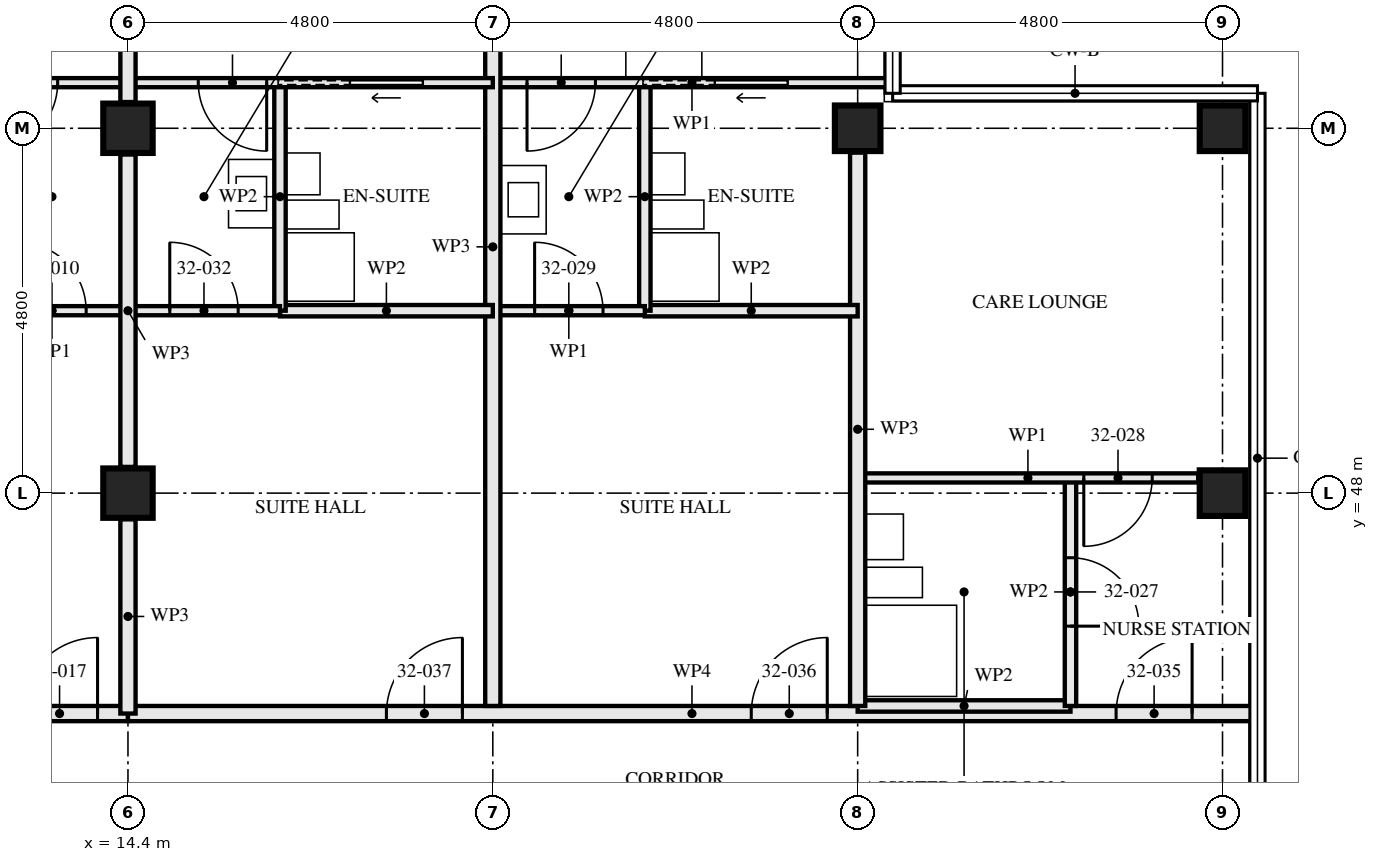
"""IFC4 building model, lengths in metres.
Left out: names, types, materials, properties, quantities, classifications, styles, units other than length and angle.
Written with IfcOpenShell. Run it as: python <this file> out.ifc"""

import sys

from ifc_helpers import new_model, si_unit, direction, frame, frame_2d, origin, origin_2d, place, context, subcontext, project, spatial, rectangle, hollow_rectangle, extrude, element, fill, save


model = new_model("IFC4")
c1 = context("Model", 3, precision=1e-05, world=origin(), true_north=direction((0.0, 1.0)))
c2 = subcontext(c1, "Body", "Model", "MODEL_VIEW")
j1 = project(units=[si_unit("LENGTHUNIT", "METRE"), si_unit("PLANEANGLEUNIT", "RADIAN")], contexts=[c1])
p1 = place(None, origin())
s1 = spatial("IfcSite", under=j1, at=p1, CompositionType="ELEMENT")
p2 = place(p1, origin())
s2 = spatial("IfcBuilding", under=s1, at=p2, CompositionType="ELEMENT")
p3 = place(p2, frame((0.0, 0.0, 119.0)))
s3 = spatial("IfcBuildingStorey", under=s2, at=p3, CompositionType="ELEMENT", Elevation=119.0)
for number, where, z_axis, x_axis in (
    (1, (14.4, 48.0, 0.0), (0.0, 0.0, 1.0), (1.0, 0.0, 0.0)),
    (2, (14.4, 52.8, 0.0), (0.0, 0.0, 1.0), (1.0, 0.0, 0.0)),
):
    element("IfcColumn", number, at=place(p3, frame(where, z_axis=z_axis, x_axis=x_axis)), inside=s3, PredefinedType="COLUMN", context=c2, shape_type="SweptSolid", body=[
        extrude(hollow_rectangle(XDim=0.65, YDim=0.65, WallThickness=0.05, at=origin_2d()), origin(), (0.0, 0.0, 1.0), 3.5),
    ])
for number, where, z_axis, x_axis in (
    (3, (24.0, 52.8, 0.0), (0.0, 0.0, 1.0), (0.0, 1.0, 0.0)),
    (4, (28.8, 48.0, 0.0), (0.0, 0.0, 1.0), (1.0, 0.0, 0.0)),
    (5, (28.8, 52.8, 0.0), (0.0, 0.0, 1.0), (0.0, 1.0, 0.0)),
):
    element("IfcColumn", number, at=place(p3, frame(where, z_axis=z_axis, x_axis=x_axis)), inside=s3, PredefinedType="COLUMN", context=c2, shape_type="SweptSolid", body=[
        extrude(hollow_rectangle(XDim=0.6, YDim=0.6, WallThickness=0.08, at=origin_2d()), origin(), (0.0, 0.0, 1.0), 3.5),
    ])
p4 = place(p3, frame((14.4, 50.4, 0.0), z_axis=(0.0, 0.0, 1.0), x_axis=(-1.0, 0.0, 0.0)))
e6 = element("IfcWall", 6, at=p4, inside=s3, PredefinedType="PARTITIONING", context=c2, shape_type="SweptSolid", body=[
    extrude(rectangle(XDim=2.0, YDim=0.12, at=frame_2d((1.0, 0.0))), origin(), (0.0, 0.0, 1.0), 3.33),
])
p5 = place(p4, frame((0.55, 0.0, 0.0)))
e7 = element("IfcOpeningElement", 7, at=p5, cuts=e6, PredefinedType="OPENING", context=c2, shape_type="SweptSolid", body=[
    extrude(rectangle(XDim=0.9, YDim=2.1, at=frame_2d((0.45, 1.05))), frame((0.0, 0.071, 0.0), z_axis=(0.0, -1.0, 0.0), x_axis=(1.0, 0.0, 0.0)), (0.0, 0.0, 1.0), 0.141),
])
p6 = place(p3, frame((14.4, 53.4, 0.0), z_axis=(0.0, 0.0, 1.0), x_axis=(-1.0, 0.0, 0.0)))
e8 = element("IfcWall", 8, at=p6, inside=s3, PredefinedType="PARTITIONING", context=c2, shape_type="SweptSolid", body=[
    extrude(rectangle(XDim=4.8, YDim=0.12, at=frame_2d((2.4, 0.0))), origin(), (0.0, 0.0, 1.0), 3.33),
])
p7 = place(p6, frame((0.925, 0.0, 0.0)))
e9 = element("IfcOpeningElement", 9, at=p7, cuts=e8, PredefinedType="OPENING", context=c2, shape_type="SweptSolid", body=[
    extrude(rectangle(XDim=0.9, YDim=2.1, at=frame_2d((0.45, 1.05))), frame((0.0, 0.071, 0.0), z_axis=(0.0, -1.0, 0.0), x_axis=(1.0, 0.0, 0.0)), (0.0, 0.0, 1.0), 0.141),
])
p8 = place(p6, frame((2.925, 0.0, 0.0)))
e10 = element("IfcOpeningElement", 10, at=p8, cuts=e8, PredefinedType="OPENING", context=c2, shape_type="SweptSolid", body=[
    extrude(rectangle(XDim=0.95, YDim=2.1, at=frame_2d((0.475, 1.05))), frame((0.0, 0.071, 0.0), z_axis=(0.0, -1.0, 0.0), x_axis=(1.0, 0.0, 0.0)), (0.0, 0.0, 1.0), 0.141),
])
p9 = place(p3, frame((14.4, 45.1, 0.0), z_axis=(0.0, 0.0, 1.0), x_axis=(-1.0, 0.0, 0.0)))
e11 = element("IfcWall", 11, at=p9, inside=s3, PredefinedType="PARTITIONING", context=c2, shape_type="SweptSolid", body=[
    extrude(rectangle(XDim=9.6, YDim=0.2, at=frame_2d((4.8, 0.0))), origin(), (0.0, 0.0, 1.0), 3.33),
])
p10 = place(p9, frame((0.4, 0.0, 0.0)))
e12 = element("IfcOpeningElement", 12, at=p10, cuts=e11, PredefinedType="OPENING", context=c2, shape_type="SweptSolid", body=[
    extrude(rectangle(XDim=1.0, YDim=2.1, at=frame_2d((0.5, 1.05))), frame((0.0, 0.111, 0.0), z_axis=(0.0, -1.0, 0.0), x_axis=(1.0, 0.0, 0.0)), (0.0, 0.0, 1.0), 0.221),
])
p11 = place(p9, frame((5.2, 0.0, 0.0)))
e13 = element("IfcOpeningElement", 13, at=p11, cuts=e11, PredefinedType="OPENING", context=c2, shape_type="SweptSolid", body=[
    extrude(rectangle(XDim=1.0, YDim=2.1, at=frame_2d((0.5, 1.05))), frame((0.0, 0.111, 0.0), z_axis=(0.0, -1.0, 0.0), x_axis=(1.0, 0.0, 0.0)), (0.0, 0.0, 1.0), 0.221),
])
p12 = place(p3, frame((26.8, 48.2, 0.0), z_axis=(0.0, 0.0, 1.0), x_axis=(0.0, -1.0, 0.0)))
e14 = element("IfcWall", 14, at=p12, inside=s3, PredefinedType="PARTITIONING", context=c2, shape_type="SweptSolid", body=[
    extrude(rectangle(XDim=3.0, YDim=0.15, at=frame_2d((1.5, 0.0))), origin(), (0.0, 0.0, 1.0), 2.55),
])
p13 = place(p12, frame((1.05, 0.0, 0.0)))
e15 = element("IfcOpeningElement", 15, at=p13, cuts=e14, PredefinedType="OPENING", context=c2, shape_type="SweptSolid", body=[
    extrude(rectangle(XDim=0.9, YDim=2.1, at=frame_2d((0.45, 1.05))), frame((0.0, 0.085, 0.0), z_axis=(0.0, -1.0, 0.0), x_axis=(1.0, 0.0, 0.0)), (0.0, 0.0, 1.0), 0.171),
])
p14 = place(p3, frame((26.8, 45.2, 0.0), z_axis=(0.0, 0.0, 1.0), x_axis=(-1.0, 0.0, 0.0)))
e16 = element("IfcWall", 16, at=p14, inside=s3, PredefinedType="PARTITIONING", context=c2, shape_type="SweptSolid", body=[
    extrude(rectangle(XDim=2.8, YDim=0.15, at=frame_2d((1.4, 0.0))), origin(), (0.0, 0.0, 1.0), 3.33),
])
p15 = place(p3, frame((28.48, 48.2, 0.0), z_axis=(0.0, 0.0, 1.0), x_axis=(-1.0, 0.0, 0.0)))
e17 = element("IfcWall", 17, at=p15, inside=s3, PredefinedType="PARTITIONING", context=c2, shape_type="SweptSolid", body=[
    extrude(rectangle(XDim=4.48, YDim=0.12, at=frame_2d((2.24, 0.0))), origin(), (0.0, 0.0, 1.0), 3.33),
])
p16 = place(p15, frame((0.605, 0.0, 0.0)))
e18 = element("IfcOpeningElement", 18, at=p16, cuts=e17, PredefinedType="OPENING", context=c2, shape_type="SweptSolid", body=[
    extrude(rectangle(XDim=0.9, YDim=2.1, at=frame_2d((0.45, 1.05))), frame((0.0, 0.071, 0.0), z_axis=(0.0, -1.0, 0.0), x_axis=(1.0, 0.0, 0.0)), (0.0, 0.0, 1.0), 0.141),
])
p17 = place(p3, frame((24.0, 52.48, 0.0), z_axis=(0.0, 0.0, 1.0), x_axis=(0.0, -1.0, 0.0)))
e19 = element("IfcWall", 19, at=p17, inside=s3, PredefinedType="PARTITIONING", context=c2, shape_type="SweptSolid", body=[
    extrude(rectangle(XDim=7.28, YDim=0.2, at=frame_2d((3.64, 0.0))), origin(), (0.0, 0.0, 1.0), 2.55),
])
p18 = place(p3, frame((21.2, 53.4, 0.0), z_axis=(0.0, 0.0, 1.0), x_axis=(0.0, -1.0, 0.0)))
e20 = element("IfcWall", 20, at=p18, inside=s3, PredefinedType="PARTITIONING", context=c2, shape_type="SweptSolid", body=[
    extrude(rectangle(XDim=3.0, YDim=0.15, at=frame_2d((1.5, 0.0))), origin(), (0.0, 0.0, 1.0), 2.55),
])
p19 = place(p3, frame((24.0, 50.4, 0.0), z_axis=(0.0, 0.0, 1.0), x_axis=(-1.0, 0.0, 0.0)))
e21 = element("IfcWall", 21, at=p19, inside=s3, PredefinedType="PARTITIONING", context=c2, shape_type="SweptSolid", body=[
    extrude(rectangle(XDim=2.8, YDim=0.15, at=frame_2d((1.4, 0.0))), origin(), (0.0, 0.0, 1.0), 3.33),
])
p20 = place(p3, frame((21.2, 50.4, 0.0), z_axis=(0.0, 0.0, 1.0), x_axis=(-1.0, 0.0, 0.0)))
e22 = element("IfcWall", 22, at=p20, inside=s3, PredefinedType="PARTITIONING", context=c2, shape_type="SweptSolid", body=[
    extrude(rectangle(XDim=2.0, YDim=0.12, at=frame_2d((1.0, 0.0))), origin(), (0.0, 0.0, 1.0), 3.33),
])
p21 = place(p20, frame((0.55, 0.0, 0.0)))
e23 = element("IfcOpeningElement", 23, at=p21, cuts=e22, PredefinedType="OPENING", context=c2, shape_type="SweptSolid", body=[
    extrude(rectangle(XDim=0.9, YDim=2.1, at=frame_2d((0.45, 1.05))), frame((0.0, 0.071, 0.0), z_axis=(0.0, -1.0, 0.0), x_axis=(1.0, 0.0, 0.0)), (0.0, 0.0, 1.0), 0.141),
])
p22 = place(p3, frame((24.44, 53.4, 0.0), z_axis=(0.0, 0.0, 1.0), x_axis=(-1.0, 0.0, 0.0)))
e24 = element("IfcWall", 24, at=p22, inside=s3, PredefinedType="PARTITIONING", context=c2, shape_type="SweptSolid", body=[
    extrude(rectangle(XDim=5.24, YDim=0.12, at=frame_2d((2.62, 0.0))), origin(), (0.0, 0.0, 1.0), 2.32),
])
p23 = place(p22, frame((3.89, 0.0, 0.0)))
e25 = element("IfcOpeningElement", 25, at=p23, cuts=e24, PredefinedType="OPENING", context=c2, shape_type="SweptSolid", body=[
    extrude(rectangle(XDim=0.9, YDim=2.1, at=frame_2d((0.45, 1.05))), frame((0.0, 0.071, 0.0), z_axis=(0.0, -1.0, 0.0), x_axis=(1.0, 0.0, 0.0)), (0.0, 0.0, 1.0), 0.141),
])
p24 = place(p22, frame((1.365, 0.0, 0.0)))
e26 = element("IfcOpeningElement", 26, at=p24, cuts=e24, PredefinedType="OPENING", context=c2, shape_type="SweptSolid", body=[
    extrude(rectangle(XDim=0.95, YDim=2.1, at=frame_2d((0.475, 1.05))), frame((0.0, 0.071, 0.0), z_axis=(0.0, -1.0, 0.0), x_axis=(1.0, 0.0, 0.0)), (0.0, 0.0, 1.0), 0.141),
])
p25 = place(p3, frame((19.2, 57.28, 0.0), z_axis=(0.0, 0.0, 1.0), x_axis=(0.0, -1.0, 0.0)))
e27 = element("IfcWall", 27, at=p25, inside=s3, PredefinedType="PARTITIONING", context=c2, shape_type="SweptSolid", body=[
    extrude(rectangle(XDim=12.08, YDim=0.2, at=frame_2d((6.04, 0.0))), origin(), (0.0, 0.0, 1.0), 2.55),
])
p26 = place(p3, frame((16.4, 53.4, 0.0), z_axis=(0.0, 0.0, 1.0), x_axis=(0.0, -1.0, 0.0)))
e28 = element("IfcWall", 28, at=p26, inside=s3, PredefinedType="PARTITIONING", context=c2, shape_type="SweptSolid", body=[
    extrude(rectangle(XDim=3.0, YDim=0.15, at=frame_2d((1.5, 0.0))), origin(), (0.0, 0.0, 1.0), 2.55),
])
p27 = place(p3, frame((19.2, 50.4, 0.0), z_axis=(0.0, 0.0, 1.0), x_axis=(-1.0, 0.0, 0.0)))
e29 = element("IfcWall", 29, at=p27, inside=s3, PredefinedType="PARTITIONING", context=c2, shape_type="SweptSolid", body=[
    extrude(rectangle(XDim=2.8, YDim=0.15, at=frame_2d((1.4, 0.0))), origin(), (0.0, 0.0, 1.0), 3.33),
])
p28 = place(p3, frame((16.4, 50.4, 0.0), z_axis=(0.0, 0.0, 1.0), x_axis=(-1.0, 0.0, 0.0)))
e30 = element("IfcWall", 30, at=p28, inside=s3, PredefinedType="PARTITIONING", context=c2, shape_type="SweptSolid", body=[
    extrude(rectangle(XDim=2.0, YDim=0.12, at=frame_2d((1.0, 0.0))), origin(), (0.0, 0.0, 1.0), 3.33),
])
p29 = place(p28, frame((0.55, 0.0, 0.0)))
e31 = element("IfcOpeningElement", 31, at=p29, cuts=e30, PredefinedType="OPENING", context=c2, shape_type="SweptSolid", body=[
    extrude(rectangle(XDim=0.9, YDim=2.1, at=frame_2d((0.45, 1.05))), frame((0.0, 0.071, 0.0), z_axis=(0.0, -1.0, 0.0), x_axis=(1.0, 0.0, 0.0)), (0.0, 0.0, 1.0), 0.141),
])
p30 = place(p3, frame((19.2, 53.4, 0.0), z_axis=(0.0, 0.0, 1.0), x_axis=(-1.0, 0.0, 0.0)))
e32 = element("IfcWall", 32, at=p30, inside=s3, PredefinedType="PARTITIONING", context=c2, shape_type="SweptSolid", body=[
    extrude(rectangle(XDim=4.8, YDim=0.12, at=frame_2d((2.4, 0.0))), origin(), (0.0, 0.0, 1.0), 3.33),
])
p31 = place(p30, frame((2.975, 0.0, 0.0)))
e33 = element("IfcOpeningElement", 33, at=p31, cuts=e32, PredefinedType="OPENING", context=c2, shape_type="SweptSolid", body=[
    extrude(rectangle(XDim=0.9, YDim=2.1, at=frame_2d((0.45, 1.05))), frame((0.0, 0.071, 0.0), z_axis=(0.0, -1.0, 0.0), x_axis=(1.0, 0.0, 0.0)), (0.0, 0.0, 1.0), 0.141),
])
p32 = place(p30, frame((0.925, 0.0, 0.0)))
e34 = element("IfcOpeningElement", 34, at=p32, cuts=e32, PredefinedType="OPENING", context=c2, shape_type="SweptSolid", body=[
    extrude(rectangle(XDim=0.95, YDim=2.1, at=frame_2d((0.475, 1.05))), frame((0.0, 0.071, 0.0), z_axis=(0.0, -1.0, 0.0), x_axis=(1.0, 0.0, 0.0)), (0.0, 0.0, 1.0), 0.141),
])
p33 = place(p3, frame((29.24, 45.1, 0.0), z_axis=(0.0, 0.0, 1.0), x_axis=(-1.0, 0.0, 0.0)))
e35 = element("IfcWall", 35, at=p33, inside=s3, PredefinedType="PARTITIONING", context=c2, shape_type="SweptSolid", body=[
    extrude(rectangle(XDim=14.84, YDim=0.2, at=frame_2d((7.42, 0.0))), origin(), (0.0, 0.0, 1.0), 2.32),
])
p34 = place(p33, frame((0.84, 0.0, 0.0)))
e36 = element("IfcOpeningElement", 36, at=p34, cuts=e35, PredefinedType="OPENING", context=c2, shape_type="SweptSolid", body=[
    extrude(rectangle(XDim=1.0, YDim=2.1, at=frame_2d((0.5, 1.05))), frame((0.0, 0.111, 0.0), z_axis=(0.0, -1.0, 0.0), x_axis=(1.0, 0.0, 0.0)), (0.0, 0.0, 1.0), 0.221),
])
p35 = place(p33, frame((5.64, 0.0, 0.0)))
e37 = element("IfcOpeningElement", 37, at=p35, cuts=e35, PredefinedType="OPENING", context=c2, shape_type="SweptSolid", body=[
    extrude(rectangle(XDim=1.0, YDim=2.1, at=frame_2d((0.5, 1.05))), frame((0.0, 0.111, 0.0), z_axis=(0.0, -1.0, 0.0), x_axis=(1.0, 0.0, 0.0)), (0.0, 0.0, 1.0), 0.221),
])
p36 = place(p33, frame((10.44, 0.0, 0.0)))
e38 = element("IfcOpeningElement", 38, at=p36, cuts=e35, PredefinedType="OPENING", context=c2, shape_type="SweptSolid", body=[
    extrude(rectangle(XDim=1.0, YDim=2.1, at=frame_2d((0.5, 1.05))), frame((0.0, 0.111, 0.0), z_axis=(0.0, -1.0, 0.0), x_axis=(1.0, 0.0, 0.0)), (0.0, 0.0, 1.0), 0.221),
])
p37 = place(p3, frame((14.4, 45.1, 0.0), z_axis=(0.0, 0.0, 1.0), x_axis=(0.0, 1.0, 0.0)))
e39 = element("IfcWall", 39, at=p37, inside=s3, PredefinedType="PARTITIONING", context=c2, shape_type="SweptSolid", body=[
    extrude(rectangle(XDim=2.555, YDim=0.2, at=frame_2d((1.277, 0.0))), origin(), (0.0, 0.0, 1.0), 2.32),
])
p38 = place(p3, frame((14.4, 48.345, 0.0), z_axis=(0.0, 0.0, 1.0), x_axis=(0.0, 1.0, 0.0)))
e40 = element("IfcWall", 40, at=p38, inside=s3, PredefinedType="PARTITIONING", context=c2, shape_type="SweptSolid", body=[
    extrude(rectangle(XDim=4.11, YDim=0.2, at=frame_2d((2.055, 0.0))), origin(), (0.0, 0.0, 1.0), 2.32),
])
p39 = place(p3, frame((14.4, 53.145, 0.0), z_axis=(0.0, 0.0, 1.0), x_axis=(0.0, 1.0, 0.0)))
e41 = element("IfcWall", 41, at=p39, inside=s3, PredefinedType="PARTITIONING", context=c2, shape_type="SweptSolid", body=[
    extrude(rectangle(XDim=4.135, YDim=0.2, at=frame_2d((2.067, 0.0))), origin(), (0.0, 0.0, 1.0), 2.32),
])
p40 = place(p5, frame((0.9, 0.0, 0.0), z_axis=(0.0, 0.0, 1.0), x_axis=(-1.0, 0.0, 0.0)))
e42 = element("IfcDoor", 42, at=p40, inside=s3, OperationType="SINGLE_SWING_RIGHT", PredefinedType="DOOR", context=c2, shape_type="SweptSolid", body=[
    extrude(rectangle(XDim=0.9, YDim=2.1, at=frame_2d((0.45, 1.05))), frame((0.0, 0.022, 0.0), z_axis=(0.0, -1.0, 0.0), x_axis=(1.0, 0.0, 0.0)), (0.0, 0.0, 1.0), 0.044),
])
fill(e7, e42)
p41 = place(p7, origin())
e43 = element("IfcDoor", 43, at=p41, inside=s3, OperationType="SINGLE_SWING_LEFT", PredefinedType="DOOR", context=c2, shape_type="SweptSolid", body=[
    extrude(rectangle(XDim=0.9, YDim=2.1, at=frame_2d((0.45, 1.05))), frame((0.0, 0.022, 0.0), z_axis=(0.0, -1.0, 0.0), x_axis=(1.0, 0.0, 0.0)), (0.0, 0.0, 1.0), 0.044),
])
fill(e9, e43)
p42 = place(p10, frame((1.0, 0.0, 0.0), z_axis=(0.0, 0.0, 1.0), x_axis=(-1.0, 0.0, 0.0)))
e44 = element("IfcDoor", 44, at=p42, inside=s3, OperationType="SINGLE_SWING_LEFT", PredefinedType="DOOR", context=c2, shape_type="SweptSolid", body=[
    extrude(rectangle(XDim=1.0, YDim=2.1, at=frame_2d((0.5, 1.05))), frame((0.0, 0.027, 0.0), z_axis=(0.0, -1.0, 0.0), x_axis=(1.0, 0.0, 0.0)), (0.0, 0.0, 1.0), 0.054),
])
fill(e12, e44)
p43 = place(p13, origin())
e45 = element("IfcDoor", 45, at=p43, inside=s3, OperationType="SINGLE_SWING_LEFT", PredefinedType="DOOR", context=c2, shape_type="SweptSolid", body=[
    extrude(rectangle(XDim=0.9, YDim=2.1, at=frame_2d((0.45, 1.05))), frame((0.0, 0.022, 0.0), z_axis=(0.0, -1.0, 0.0), x_axis=(1.0, 0.0, 0.0)), (0.0, 0.0, 1.0), 0.044),
])
fill(e15, e45)
p44 = place(p16, origin())
e46 = element("IfcDoor", 46, at=p44, inside=s3, OperationType="SINGLE_SWING_LEFT", PredefinedType="DOOR", context=c2, shape_type="SweptSolid", body=[
    extrude(rectangle(XDim=0.9, YDim=2.1, at=frame_2d((0.45, 1.05))), frame((0.0, 0.022, 0.0), z_axis=(0.0, -1.0, 0.0), x_axis=(1.0, 0.0, 0.0)), (0.0, 0.0, 1.0), 0.044),
])
fill(e18, e46)
p45 = place(p21, frame((0.9, 0.0, 0.0), z_axis=(0.0, 0.0, 1.0), x_axis=(-1.0, 0.0, 0.0)))
e47 = element("IfcDoor", 47, at=p45, inside=s3, OperationType="SINGLE_SWING_RIGHT", PredefinedType="DOOR", context=c2, shape_type="SweptSolid", body=[
    extrude(rectangle(XDim=0.9, YDim=2.1, at=frame_2d((0.45, 1.05))), frame((0.0, 0.022, 0.0), z_axis=(0.0, -1.0, 0.0), x_axis=(1.0, 0.0, 0.0)), (0.0, 0.0, 1.0), 0.044),
])
fill(e23, e47)
p46 = place(p23, origin())
e48 = element("IfcDoor", 48, at=p46, inside=s3, OperationType="SINGLE_SWING_LEFT", PredefinedType="DOOR", context=c2, shape_type="SweptSolid", body=[
    extrude(rectangle(XDim=0.9, YDim=2.1, at=frame_2d((0.45, 1.05))), frame((0.0, 0.022, 0.0), z_axis=(0.0, -1.0, 0.0), x_axis=(1.0, 0.0, 0.0)), (0.0, 0.0, 1.0), 0.044),
])
fill(e25, e48)
p47 = place(p24, origin())
e49 = element("IfcDoor", 49, at=p47, inside=s3, OperationType="SLIDING_TO_LEFT", PredefinedType="DOOR", context=c2, shape_type="SweptSolid", body=[
    extrude(rectangle(XDim=0.95, YDim=2.1, at=frame_2d((0.475, 1.05))), frame((0.0, 0.022, 0.0), z_axis=(0.0, -1.0, 0.0), x_axis=(1.0, 0.0, 0.0)), (0.0, 0.0, 1.0), 0.044),
])
fill(e26, e49)
p48 = place(p29, frame((0.9, 0.0, 0.0), z_axis=(0.0, 0.0, 1.0), x_axis=(-1.0, 0.0, 0.0)))
e50 = element("IfcDoor", 50, at=p48, inside=s3, OperationType="SINGLE_SWING_RIGHT", PredefinedType="DOOR", context=c2, shape_type="SweptSolid", body=[
    extrude(rectangle(XDim=0.9, YDim=2.1, at=frame_2d((0.45, 1.05))), frame((0.0, 0.022, 0.0), z_axis=(0.0, -1.0, 0.0), x_axis=(1.0, 0.0, 0.0)), (0.0, 0.0, 1.0), 0.044),
])
fill(e31, e50)
p49 = place(p31, origin())
e51 = element("IfcDoor", 51, at=p49, inside=s3, OperationType="SINGLE_SWING_RIGHT", PredefinedType="DOOR", context=c2, shape_type="SweptSolid", body=[
    extrude(rectangle(XDim=0.9, YDim=2.1, at=frame_2d((0.45, 1.05))), frame((0.0, 0.022, 0.0), z_axis=(0.0, -1.0, 0.0), x_axis=(1.0, 0.0, 0.0)), (0.0, 0.0, 1.0), 0.044),
])
fill(e33, e51)
p50 = place(p32, origin())
e52 = element("IfcDoor", 52, at=p50, inside=s3, OperationType="SLIDING_TO_LEFT", PredefinedType="DOOR", context=c2, shape_type="SweptSolid", body=[
    extrude(rectangle(XDim=0.95, YDim=2.1, at=frame_2d((0.475, 1.05))), frame((0.0, 0.022, 0.0), z_axis=(0.0, -1.0, 0.0), x_axis=(1.0, 0.0, 0.0)), (0.0, 0.0, 1.0), 0.044),
])
fill(e34, e52)
p51 = place(p34, frame((1.0, 0.0, 0.0), z_axis=(0.0, 0.0, 1.0), x_axis=(-1.0, 0.0, 0.0)))
e53 = element("IfcDoor", 53, at=p51, inside=s3, OperationType="SINGLE_SWING_LEFT", PredefinedType="DOOR", context=c2, shape_type="SweptSolid", body=[
    extrude(rectangle(XDim=1.0, YDim=2.1, at=frame_2d((0.5, 1.05))), frame((0.0, 0.027, 0.0), z_axis=(0.0, -1.0, 0.0), x_axis=(1.0, 0.0, 0.0)), (0.0, 0.0, 1.0), 0.054),
])
fill(e36, e53)
p52 = place(p35, frame((1.0, 0.0, 0.0), z_axis=(0.0, 0.0, 1.0), x_axis=(-1.0, 0.0, 0.0)))
e54 = element("IfcDoor", 54, at=p52, inside=s3, OperationType="SINGLE_SWING_LEFT", PredefinedType="DOOR", context=c2, shape_type="SweptSolid", body=[
    extrude(rectangle(XDim=1.0, YDim=2.1, at=frame_2d((0.5, 1.05))), frame((0.0, 0.027, 0.0), z_axis=(0.0, -1.0, 0.0), x_axis=(1.0, 0.0, 0.0)), (0.0, 0.0, 1.0), 0.054),
])
fill(e37, e54)
p53 = place(p36, frame((1.0, 0.0, 0.0), z_axis=(0.0, 0.0, 1.0), x_axis=(-1.0, 0.0, 0.0)))
e55 = element("IfcDoor", 55, at=p53, inside=s3, OperationType="SINGLE_SWING_LEFT", PredefinedType="DOOR", context=c2, shape_type="SweptSolid", body=[
    extrude(rectangle(XDim=1.0, YDim=2.1, at=frame_2d((0.5, 1.05))), frame((0.0, 0.027, 0.0), z_axis=(0.0, -1.0, 0.0), x_axis=(1.0, 0.0, 0.0)), (0.0, 0.0, 1.0), 0.054),
])
fill(e38, e55)
save(model, sys.argv[1])
